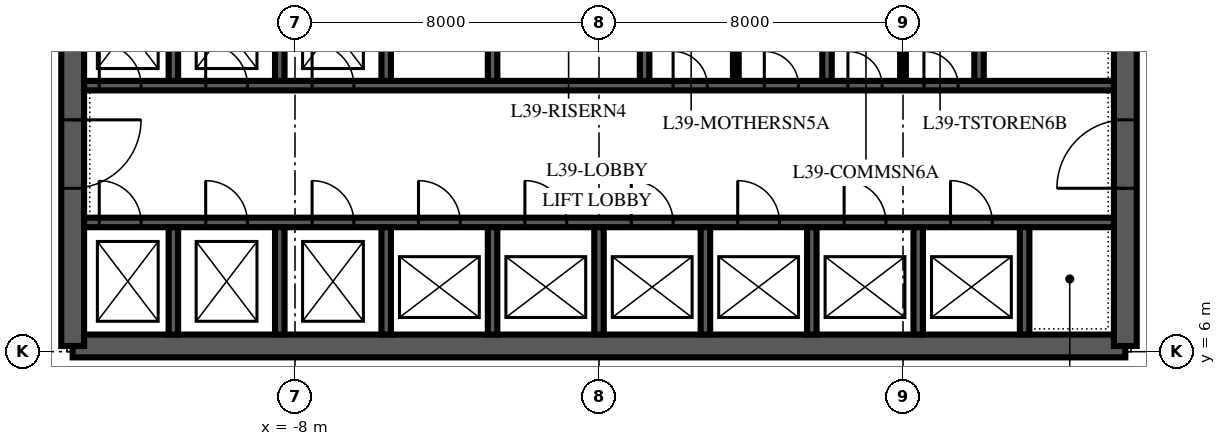
"""IFC4 building model, lengths in metres.
Left out: names, types, materials, properties, quantities, classifications, styles, units other than length and angle.
Written with IfcOpenShell. Run it as: python <this file> out.ifc"""

import sys

from ifc_helpers import new_model, si_unit, direction, frame, frame_2d, origin, place, context, subcontext, project, spatial, polyline, rectangle, outline, extrude, element, fill, save


model = new_model("IFC4")
c1 = context("Model", 3, precision=1e-05, world=origin(), true_north=direction((0.0, 1.0)))
c2 = subcontext(c1, "Body", "Model", "MODEL_VIEW")
j1 = project(units=[si_unit("LENGTHUNIT", "METRE"), si_unit("PLANEANGLEUNIT", "RADIAN")], contexts=[c1])
p1 = place(None, origin())
s1 = spatial("IfcSite", under=j1, at=p1, CompositionType="ELEMENT")
p2 = place(p1, origin())
s2 = spatial("IfcBuilding", under=s1, at=p2, CompositionType="ELEMENT")
p3 = place(p2, frame((0.0, 0.0, 173.0)))
s3 = spatial("IfcBuildingStorey", under=s2, at=p3, CompositionType="ELEMENT", Elevation=173.0)
p4 = place(p3, frame((-13.85, 6.15, 0.0), z_axis=(0.0, 0.0, 1.0), x_axis=(1.0, 0.0, 0.0)))
e1 = element("IfcWall", 1, at=p4, inside=s3, PredefinedType="SHEAR", context=c2, shape_type="SweptSolid", body=[
    extrude(rectangle(XDim=27.7, YDim=0.6, at=frame_2d((13.85, 0.0))), origin(), (0.0, 0.0, 1.0), 5.0),
])
p5 = place(p3, frame((13.85, 6.15, 0.0), z_axis=(0.0, 0.0, 1.0), x_axis=(0.0, 1.0, 0.0)))
e2 = element("IfcWall", 2, at=p5, inside=s3, PredefinedType="SHEAR", context=c2, shape_type="SweptSolid", body=[
    extrude(outline(polyline([(0.0, -0.3), (17.7, -0.3), (17.7, 0.0), (17.4, 0.0), (17.4, 0.3), (0.3, 0.3), (0.3, 0.0), (0.0, 0.0), (0.0, -0.3)])), origin(), (0.0, 0.0, 1.0), 5.0),
])
p6 = place(p5, frame((4.15, 0.0, 0.0)))
e3 = element("IfcOpeningElement", 3, at=p6, cuts=e2, PredefinedType="OPENING", context=c2, shape_type="SweptSolid", body=[
    extrude(rectangle(XDim=1.8, YDim=2.4, at=frame_2d((0.9, 1.2))), frame((0.0, 0.315, 0.0), z_axis=(0.0, -1.0, 0.0), x_axis=(1.0, 0.0, 0.0)), (0.0, 0.0, 1.0), 0.63),
])
p7 = place(p3, frame((-13.85, 23.85, 0.0), z_axis=(0.0, 0.0, 1.0), x_axis=(0.0, -1.0, 0.0)))
e4 = element("IfcWall", 4, at=p7, inside=s3, PredefinedType="SHEAR", context=c2, shape_type="SweptSolid", body=[
    extrude(outline(polyline([(0.0, -0.3), (17.7, -0.3), (17.7, 0.0), (17.4, 0.0), (17.4, 0.3), (0.3, 0.3), (0.3, 0.0), (0.0, 0.0), (0.0, -0.3)])), origin(), (0.0, 0.0, 1.0), 5.0),
])
p8 = place(p7, frame((11.75, 0.0, 0.0)))
e5 = element("IfcOpeningElement", 5, at=p8, cuts=e4, PredefinedType="OPENING", context=c2, shape_type="SweptSolid", body=[
    extrude(rectangle(XDim=1.8, YDim=2.4, at=frame_2d((0.9, 1.2))), frame((0.0, 0.315, 0.0), z_axis=(0.0, -1.0, 0.0), x_axis=(1.0, 0.0, 0.0)), (0.0, 0.0, 1.0), 0.63),
])
p9 = place(p3, frame((-13.55, 9.4, 0.0), z_axis=(0.0, 0.0, 1.0), x_axis=(1.0, 0.0, 0.0)))
e6 = element("IfcWall", 6, at=p9, inside=s3, PredefinedType="SHEAR", context=c2, shape_type="SweptSolid", body=[
    extrude(rectangle(XDim=27.1, YDim=0.25, at=frame_2d((13.55, 0.0))), origin(), (0.0, 0.0, 1.0), 5.0),
])
p10 = place(p9, frame((0.4, 0.0, 0.0)))
e7 = element("IfcOpeningElement", 7, at=p10, cuts=e6, PredefinedType="OPENING", context=c2, shape_type="SweptSolid", body=[
    extrude(rectangle(XDim=1.1, YDim=2.1, at=frame_2d((0.55, 1.05))), frame((0.0, 0.14, 0.0), z_axis=(0.0, -1.0, 0.0), x_axis=(1.0, 0.0, 0.0)), (0.0, 0.0, 1.0), 0.28),
])
p11 = place(p9, frame((3.2, 0.0, 0.0)))
e8 = element("IfcOpeningElement", 8, at=p11, cuts=e6, PredefinedType="OPENING", context=c2, shape_type="SweptSolid", body=[
    extrude(rectangle(XDim=1.1, YDim=2.1, at=frame_2d((0.55, 1.05))), frame((0.0, 0.14, 0.0), z_axis=(0.0, -1.0, 0.0), x_axis=(1.0, 0.0, 0.0)), (0.0, 0.0, 1.0), 0.28),
])
p12 = place(p9, frame((6.0, 0.0, 0.0)))
e9 = element("IfcOpeningElement", 9, at=p12, cuts=e6, PredefinedType="OPENING", context=c2, shape_type="SweptSolid", body=[
    extrude(rectangle(XDim=1.1, YDim=2.1, at=frame_2d((0.55, 1.05))), frame((0.0, 0.14, 0.0), z_axis=(0.0, -1.0, 0.0), x_axis=(1.0, 0.0, 0.0)), (0.0, 0.0, 1.0), 0.28),
])
p13 = place(p9, frame((17.2, 0.0, 0.0)))
e10 = element("IfcOpeningElement", 10, at=p13, cuts=e6, PredefinedType="OPENING", context=c2, shape_type="SweptSolid", body=[
    extrude(rectangle(XDim=1.1, YDim=2.1, at=frame_2d((0.55, 1.05))), frame((0.0, 0.14, 0.0), z_axis=(0.0, -1.0, 0.0), x_axis=(1.0, 0.0, 0.0)), (0.0, 0.0, 1.0), 0.28),
])
p14 = place(p9, frame((20.0, 0.0, 0.0)))
e11 = element("IfcOpeningElement", 11, at=p14, cuts=e6, PredefinedType="OPENING", context=c2, shape_type="SweptSolid", body=[
    extrude(rectangle(XDim=1.1, YDim=2.1, at=frame_2d((0.55, 1.05))), frame((0.0, 0.14, 0.0), z_axis=(0.0, -1.0, 0.0), x_axis=(1.0, 0.0, 0.0)), (0.0, 0.0, 1.0), 0.28),
])
p15 = place(p9, frame((22.8, 0.0, 0.0)))
e12 = element("IfcOpeningElement", 12, at=p15, cuts=e6, PredefinedType="OPENING", context=c2, shape_type="SweptSolid", body=[
    extrude(rectangle(XDim=1.1, YDim=2.1, at=frame_2d((0.55, 1.05))), frame((0.0, 0.14, 0.0), z_axis=(0.0, -1.0, 0.0), x_axis=(1.0, 0.0, 0.0)), (0.0, 0.0, 1.0), 0.28),
])
p16 = place(p9, frame((8.8, 0.0, 0.0)))
e13 = element("IfcOpeningElement", 13, at=p16, cuts=e6, PredefinedType="OPENING", context=c2, shape_type="SweptSolid", body=[
    extrude(rectangle(XDim=1.1, YDim=2.1, at=frame_2d((0.55, 1.05))), frame((0.0, 0.14, 0.0), z_axis=(0.0, -1.0, 0.0), x_axis=(1.0, 0.0, 0.0)), (0.0, 0.0, 1.0), 0.28),
])
p17 = place(p9, frame((11.6, 0.0, 0.0)))
e14 = element("IfcOpeningElement", 14, at=p17, cuts=e6, PredefinedType="OPENING", context=c2, shape_type="SweptSolid", body=[
    extrude(rectangle(XDim=1.1, YDim=2.1, at=frame_2d((0.55, 1.05))), frame((0.0, 0.14, 0.0), z_axis=(0.0, -1.0, 0.0), x_axis=(1.0, 0.0, 0.0)), (0.0, 0.0, 1.0), 0.28),
])
p18 = place(p9, frame((14.4, 0.0, 0.0)))
e15 = element("IfcOpeningElement", 15, at=p18, cuts=e6, PredefinedType="OPENING", context=c2, shape_type="SweptSolid", body=[
    extrude(rectangle(XDim=1.1, YDim=2.1, at=frame_2d((0.55, 1.05))), frame((0.0, 0.14, 0.0), z_axis=(0.0, -1.0, 0.0), x_axis=(1.0, 0.0, 0.0)), (0.0, 0.0, 1.0), 0.28),
])
p19 = place(p3, frame((-13.55, 13.0, 0.0), z_axis=(0.0, 0.0, 1.0), x_axis=(1.0, 0.0, 0.0)))
e16 = element("IfcWall", 16, at=p19, inside=s3, PredefinedType="SHEAR", context=c2, shape_type="SweptSolid", body=[
    extrude(rectangle(XDim=27.1, YDim=0.25, at=frame_2d((13.55, 0.0))), origin(), (0.0, 0.0, 1.0), 5.0),
])
p20 = place(p19, frame((0.4, 0.0, 0.0)))
e17 = element("IfcOpeningElement", 17, at=p20, cuts=e16, PredefinedType="OPENING", context=c2, shape_type="SweptSolid", body=[
    extrude(rectangle(XDim=1.1, YDim=2.1, at=frame_2d((0.55, 1.05))), frame((0.0, 0.14, 0.0), z_axis=(0.0, -1.0, 0.0), x_axis=(1.0, 0.0, 0.0)), (0.0, 0.0, 1.0), 0.28),
])
p21 = place(p19, frame((3.2, 0.0, 0.0)))
e18 = element("IfcOpeningElement", 18, at=p21, cuts=e16, PredefinedType="OPENING", context=c2, shape_type="SweptSolid", body=[
    extrude(rectangle(XDim=1.1, YDim=2.1, at=frame_2d((0.55, 1.05))), frame((0.0, 0.14, 0.0), z_axis=(0.0, -1.0, 0.0), x_axis=(1.0, 0.0, 0.0)), (0.0, 0.0, 1.0), 0.28),
])
p22 = place(p19, frame((6.0, 0.0, 0.0)))
e19 = element("IfcOpeningElement", 19, at=p22, cuts=e16, PredefinedType="OPENING", context=c2, shape_type="SweptSolid", body=[
    extrude(rectangle(XDim=1.1, YDim=2.1, at=frame_2d((0.55, 1.05))), frame((0.0, 0.14, 0.0), z_axis=(0.0, -1.0, 0.0), x_axis=(1.0, 0.0, 0.0)), (0.0, 0.0, 1.0), 0.28),
])
p23 = place(p19, frame((15.5, 0.0, 0.0)))
e20 = element("IfcOpeningElement", 20, at=p23, cuts=e16, PredefinedType="OPENING", context=c2, shape_type="SweptSolid", body=[
    extrude(rectangle(XDim=0.9, YDim=2.1, at=frame_2d((0.45, 1.05))), frame((0.0, 0.14, 0.0), z_axis=(0.0, -1.0, 0.0), x_axis=(1.0, 0.0, 0.0)), (0.0, 0.0, 1.0), 0.28),
])
p24 = place(p19, frame((17.9, 0.0, 0.0)))
e21 = element("IfcOpeningElement", 21, at=p24, cuts=e16, PredefinedType="OPENING", context=c2, shape_type="SweptSolid", body=[
    extrude(rectangle(XDim=0.9, YDim=2.1, at=frame_2d((0.45, 1.05))), frame((0.0, 0.14, 0.0), z_axis=(0.0, -1.0, 0.0), x_axis=(1.0, 0.0, 0.0)), (0.0, 0.0, 1.0), 0.28),
])
p25 = place(p19, frame((20.1, 0.0, 0.0)))
e22 = element("IfcOpeningElement", 22, at=p25, cuts=e16, PredefinedType="OPENING", context=c2, shape_type="SweptSolid", body=[
    extrude(rectangle(XDim=0.9, YDim=2.1, at=frame_2d((0.45, 1.05))), frame((0.0, 0.14, 0.0), z_axis=(0.0, -1.0, 0.0), x_axis=(1.0, 0.0, 0.0)), (0.0, 0.0, 1.0), 0.28),
])
p26 = place(p19, frame((22.1, 0.0, 0.0)))
e23 = element("IfcOpeningElement", 23, at=p26, cuts=e16, PredefinedType="OPENING", context=c2, shape_type="SweptSolid", body=[
    extrude(rectangle(XDim=0.9, YDim=2.1, at=frame_2d((0.45, 1.05))), frame((0.0, 0.14, 0.0), z_axis=(0.0, -1.0, 0.0), x_axis=(1.0, 0.0, 0.0)), (0.0, 0.0, 1.0), 0.28),
])
for number, where, z_axis, x_axis in (
    (24, (-11.2, 6.45, 0.0), (0.0, 0.0, 1.0), (0.0, 1.0, 0.0)),
    (25, (-8.4, 6.45, 0.0), (0.0, 0.0, 1.0), (0.0, 1.0, 0.0)),
    (26, (-5.6, 6.45, 0.0), (0.0, 0.0, 1.0), (0.0, 1.0, 0.0)),
    (27, (-2.8, 6.45, 0.0), (0.0, 0.0, 1.0), (0.0, 1.0, 0.0)),
    (28, (0.0, 6.45, 0.0), (0.0, 0.0, 1.0), (0.0, 1.0, 0.0)),
    (29, (2.8, 6.45, 0.0), (0.0, 0.0, 1.0), (0.0, 1.0, 0.0)),
    (30, (5.6, 6.45, 0.0), (0.0, 0.0, 1.0), (0.0, 1.0, 0.0)),
    (31, (8.4, 6.45, 0.0), (0.0, 0.0, 1.0), (0.0, 1.0, 0.0)),
    (32, (11.2, 6.45, 0.0), (0.0, 0.0, 1.0), (0.0, 1.0, 0.0)),
):
    element("IfcWall", number, at=place(p3, frame(where, z_axis=z_axis, x_axis=x_axis)), inside=s3, PredefinedType="SHEAR", context=c2, shape_type="SweptSolid", body=[
        extrude(rectangle(XDim=2.825, YDim=0.25, at=frame_2d((1.413, 0.0))), origin(), (0.0, 0.0, 1.0), 5.0),
    ])
for number, where, z_axis, x_axis in (
    (33, (-11.2, 13.125, 0.0), (0.0, 0.0, 1.0), (0.0, 1.0, 0.0)),
    (34, (-8.4, 13.125, 0.0), (0.0, 0.0, 1.0), (0.0, 1.0, 0.0)),
    (35, (-5.6, 13.125, 0.0), (0.0, 0.0, 1.0), (0.0, 1.0, 0.0)),
    (36, (-2.8, 13.125, 0.0), (0.0, 0.0, 1.0), (0.0, 1.0, 0.0)),
    (37, (1.2, 13.125, 0.0), (0.0, 0.0, 1.0), (0.0, 1.0, 0.0)),
    (38, (6.0, 13.125, 0.0), (0.0, 0.0, 1.0), (0.0, 1.0, 0.0)),
    (39, (10.0, 13.125, 0.0), (0.0, 0.0, 1.0), (0.0, 1.0, 0.0)),
):
    element("IfcWall", number, at=place(p3, frame(where, z_axis=z_axis, x_axis=x_axis)), inside=s3, PredefinedType="SHEAR", context=c2, shape_type="SweptSolid", body=[
        extrude(rectangle(XDim=2.75, YDim=0.25, at=frame_2d((1.375, 0.0))), origin(), (0.0, 0.0, 1.0), 5.0),
    ])
for number, where, z_axis, x_axis in (
    (40, (3.6, 13.125, 0.0), (0.0, 0.0, 1.0), (0.0, 1.0, 0.0)),
    (41, (8.0, 13.125, 0.0), (0.0, 0.0, 1.0), (0.0, 1.0, 0.0)),
):
    element("IfcWall", number, at=place(p3, frame(where, z_axis=z_axis, x_axis=x_axis)), inside=s3, PredefinedType="PARTITIONING", context=c2, shape_type="SweptSolid", body=[
        extrude(rectangle(XDim=2.75, YDim=0.15, at=frame_2d((1.375, 0.0))), origin(), (0.0, 0.0, 1.0), 4.85),
    ])
p27 = place(p6, origin())
e42 = element("IfcDoor", 42, at=p27, inside=s3, OperationType="DOUBLE_DOOR_SINGLE_SWING", PredefinedType="DOOR", context=c2, shape_type="SweptSolid", body=[
    extrude(rectangle(XDim=1.8, YDim=2.4, at=frame_2d((0.9, 1.2))), frame((0.0, 0.3, 0.0), z_axis=(0.0, -1.0, 0.0), x_axis=(1.0, 0.0, 0.0)), (0.0, 0.0, 1.0), 0.6),
])
fill(e3, e42)
p28 = place(p8, origin())
e43 = element("IfcDoor", 43, at=p28, inside=s3, OperationType="DOUBLE_DOOR_SINGLE_SWING", PredefinedType="DOOR", context=c2, shape_type="SweptSolid", body=[
    extrude(rectangle(XDim=1.8, YDim=2.4, at=frame_2d((0.9, 1.2))), frame((0.0, 0.3, 0.0), z_axis=(0.0, -1.0, 0.0), x_axis=(1.0, 0.0, 0.0)), (0.0, 0.0, 1.0), 0.6),
])
fill(e5, e43)
p29 = place(p10, origin())
e44 = element("IfcDoor", 44, at=p29, inside=s3, OperationType="SLIDING_TO_LEFT", PredefinedType="DOOR", context=c2, shape_type="SweptSolid", body=[
    extrude(rectangle(XDim=1.1, YDim=2.1, at=frame_2d((0.55, 1.05))), frame((0.0, 0.125, 0.0), z_axis=(0.0, -1.0, 0.0), x_axis=(1.0, 0.0, 0.0)), (0.0, 0.0, 1.0), 0.25),
])
fill(e7, e44)
p30 = place(p11, origin())
e45 = element("IfcDoor", 45, at=p30, inside=s3, OperationType="SLIDING_TO_LEFT", PredefinedType="DOOR", context=c2, shape_type="SweptSolid", body=[
    extrude(rectangle(XDim=1.1, YDim=2.1, at=frame_2d((0.55, 1.05))), frame((0.0, 0.125, 0.0), z_axis=(0.0, -1.0, 0.0), x_axis=(1.0, 0.0, 0.0)), (0.0, 0.0, 1.0), 0.25),
])
fill(e8, e45)
p31 = place(p12, origin())
e46 = element("IfcDoor", 46, at=p31, inside=s3, OperationType="SLIDING_TO_LEFT", PredefinedType="DOOR", context=c2, shape_type="SweptSolid", body=[
    extrude(rectangle(XDim=1.1, YDim=2.1, at=frame_2d((0.55, 1.05))), frame((0.0, 0.125, 0.0), z_axis=(0.0, -1.0, 0.0), x_axis=(1.0, 0.0, 0.0)), (0.0, 0.0, 1.0), 0.25),
])
fill(e9, e46)
p32 = place(p20, origin())
e47 = element("IfcDoor", 47, at=p32, inside=s3, OperationType="SLIDING_TO_LEFT", PredefinedType="DOOR", context=c2, shape_type="SweptSolid", body=[
    extrude(rectangle(XDim=1.1, YDim=2.1, at=frame_2d((0.55, 1.05))), frame((0.0, 0.125, 0.0), z_axis=(0.0, -1.0, 0.0), x_axis=(1.0, 0.0, 0.0)), (0.0, 0.0, 1.0), 0.25),
])
fill(e17, e47)
p33 = place(p21, origin())
e48 = element("IfcDoor", 48, at=p33, inside=s3, OperationType="SLIDING_TO_LEFT", PredefinedType="DOOR", context=c2, shape_type="SweptSolid", body=[
    extrude(rectangle(XDim=1.1, YDim=2.1, at=frame_2d((0.55, 1.05))), frame((0.0, 0.125, 0.0), z_axis=(0.0, -1.0, 0.0), x_axis=(1.0, 0.0, 0.0)), (0.0, 0.0, 1.0), 0.25),
])
fill(e18, e48)
p34 = place(p22, origin())
e49 = element("IfcDoor", 49, at=p34, inside=s3, OperationType="SLIDING_TO_LEFT", PredefinedType="DOOR", context=c2, shape_type="SweptSolid", body=[
    extrude(rectangle(XDim=1.1, YDim=2.1, at=frame_2d((0.55, 1.05))), frame((0.0, 0.125, 0.0), z_axis=(0.0, -1.0, 0.0), x_axis=(1.0, 0.0, 0.0)), (0.0, 0.0, 1.0), 0.25),
])
fill(e19, e49)
p35 = place(p13, origin())
e50 = element("IfcDoor", 50, at=p35, inside=s3, OperationType="SLIDING_TO_LEFT", PredefinedType="DOOR", context=c2, shape_type="SweptSolid", body=[
    extrude(rectangle(XDim=1.1, YDim=2.1, at=frame_2d((0.55, 1.05))), frame((0.0, 0.125, 0.0), z_axis=(0.0, -1.0, 0.0), x_axis=(1.0, 0.0, 0.0)), (0.0, 0.0, 1.0), 0.25),
])
fill(e10, e50)
p36 = place(p14, origin())
e51 = element("IfcDoor", 51, at=p36, inside=s3, OperationType="SLIDING_TO_LEFT", PredefinedType="DOOR", context=c2, shape_type="SweptSolid", body=[
    extrude(rectangle(XDim=1.1, YDim=2.1, at=frame_2d((0.55, 1.05))), frame((0.0, 0.125, 0.0), z_axis=(0.0, -1.0, 0.0), x_axis=(1.0, 0.0, 0.0)), (0.0, 0.0, 1.0), 0.25),
])
fill(e11, e51)
p37 = place(p15, origin())
e52 = element("IfcDoor", 52, at=p37, inside=s3, OperationType="SLIDING_TO_LEFT", PredefinedType="DOOR", context=c2, shape_type="SweptSolid", body=[
    extrude(rectangle(XDim=1.1, YDim=2.1, at=frame_2d((0.55, 1.05))), frame((0.0, 0.125, 0.0), z_axis=(0.0, -1.0, 0.0), x_axis=(1.0, 0.0, 0.0)), (0.0, 0.0, 1.0), 0.25),
])
fill(e12, e52)
p38 = place(p16, origin())
e53 = element("IfcDoor", 53, at=p38, inside=s3, OperationType="SLIDING_TO_LEFT", PredefinedType="DOOR", context=c2, shape_type="SweptSolid", body=[
    extrude(rectangle(XDim=1.1, YDim=2.1, at=frame_2d((0.55, 1.05))), frame((0.0, 0.125, 0.0), z_axis=(0.0, -1.0, 0.0), x_axis=(1.0, 0.0, 0.0)), (0.0, 0.0, 1.0), 0.25),
])
fill(e13, e53)
p39 = place(p17, origin())
e54 = element("IfcDoor", 54, at=p39, inside=s3, OperationType="SLIDING_TO_LEFT", PredefinedType="DOOR", context=c2, shape_type="SweptSolid", body=[
    extrude(rectangle(XDim=1.1, YDim=2.1, at=frame_2d((0.55, 1.05))), frame((0.0, 0.125, 0.0), z_axis=(0.0, -1.0, 0.0), x_axis=(1.0, 0.0, 0.0)), (0.0, 0.0, 1.0), 0.25),
])
fill(e14, e54)
p40 = place(p18, origin())
e55 = element("IfcDoor", 55, at=p40, inside=s3, OperationType="SLIDING_TO_LEFT", PredefinedType="DOOR", context=c2, shape_type="SweptSolid", body=[
    extrude(rectangle(XDim=1.1, YDim=2.1, at=frame_2d((0.55, 1.05))), frame((0.0, 0.125, 0.0), z_axis=(0.0, -1.0, 0.0), x_axis=(1.0, 0.0, 0.0)), (0.0, 0.0, 1.0), 0.25),
])
fill(e15, e55)
p41 = place(p23, origin())
e56 = element("IfcDoor", 56, at=p41, inside=s3, OperationType="SINGLE_SWING_LEFT", PredefinedType="DOOR", context=c2, shape_type="SweptSolid", body=[
    extrude(rectangle(XDim=0.9, YDim=2.1, at=frame_2d((0.45, 1.05))), frame((0.0, 0.125, 0.0), z_axis=(0.0, -1.0, 0.0), x_axis=(1.0, 0.0, 0.0)), (0.0, 0.0, 1.0), 0.25),
])
fill(e20, e56)
p42 = place(p24, origin())
e57 = element("IfcDoor", 57, at=p42, inside=s3, OperationType="SINGLE_SWING_LEFT", PredefinedType="DOOR", context=c2, shape_type="SweptSolid", body=[
    extrude(rectangle(XDim=0.9, YDim=2.1, at=frame_2d((0.45, 1.05))), frame((0.0, 0.125, 0.0), z_axis=(0.0, -1.0, 0.0), x_axis=(1.0, 0.0, 0.0)), (0.0, 0.0, 1.0), 0.25),
])
fill(e21, e57)
p43 = place(p25, origin())
e58 = element("IfcDoor", 58, at=p43, inside=s3, OperationType="SINGLE_SWING_LEFT", PredefinedType="DOOR", context=c2, shape_type="SweptSolid", body=[
    extrude(rectangle(XDim=0.9, YDim=2.1, at=frame_2d((0.45, 1.05))), frame((0.0, 0.125, 0.0), z_axis=(0.0, -1.0, 0.0), x_axis=(1.0, 0.0, 0.0)), (0.0, 0.0, 1.0), 0.25),
])
fill(e22, e58)
p44 = place(p26, origin())
e59 = element("IfcDoor", 59, at=p44, inside=s3, OperationType="SINGLE_SWING_LEFT", PredefinedType="DOOR", context=c2, shape_type="SweptSolid", body=[
    extrude(rectangle(XDim=0.9, YDim=2.1, at=frame_2d((0.45, 1.05))), frame((0.0, 0.125, 0.0), z_axis=(0.0, -1.0, 0.0), x_axis=(1.0, 0.0, 0.0)), (0.0, 0.0, 1.0), 0.25),
])
fill(e23, e59)
save(model, sys.argv[1])
